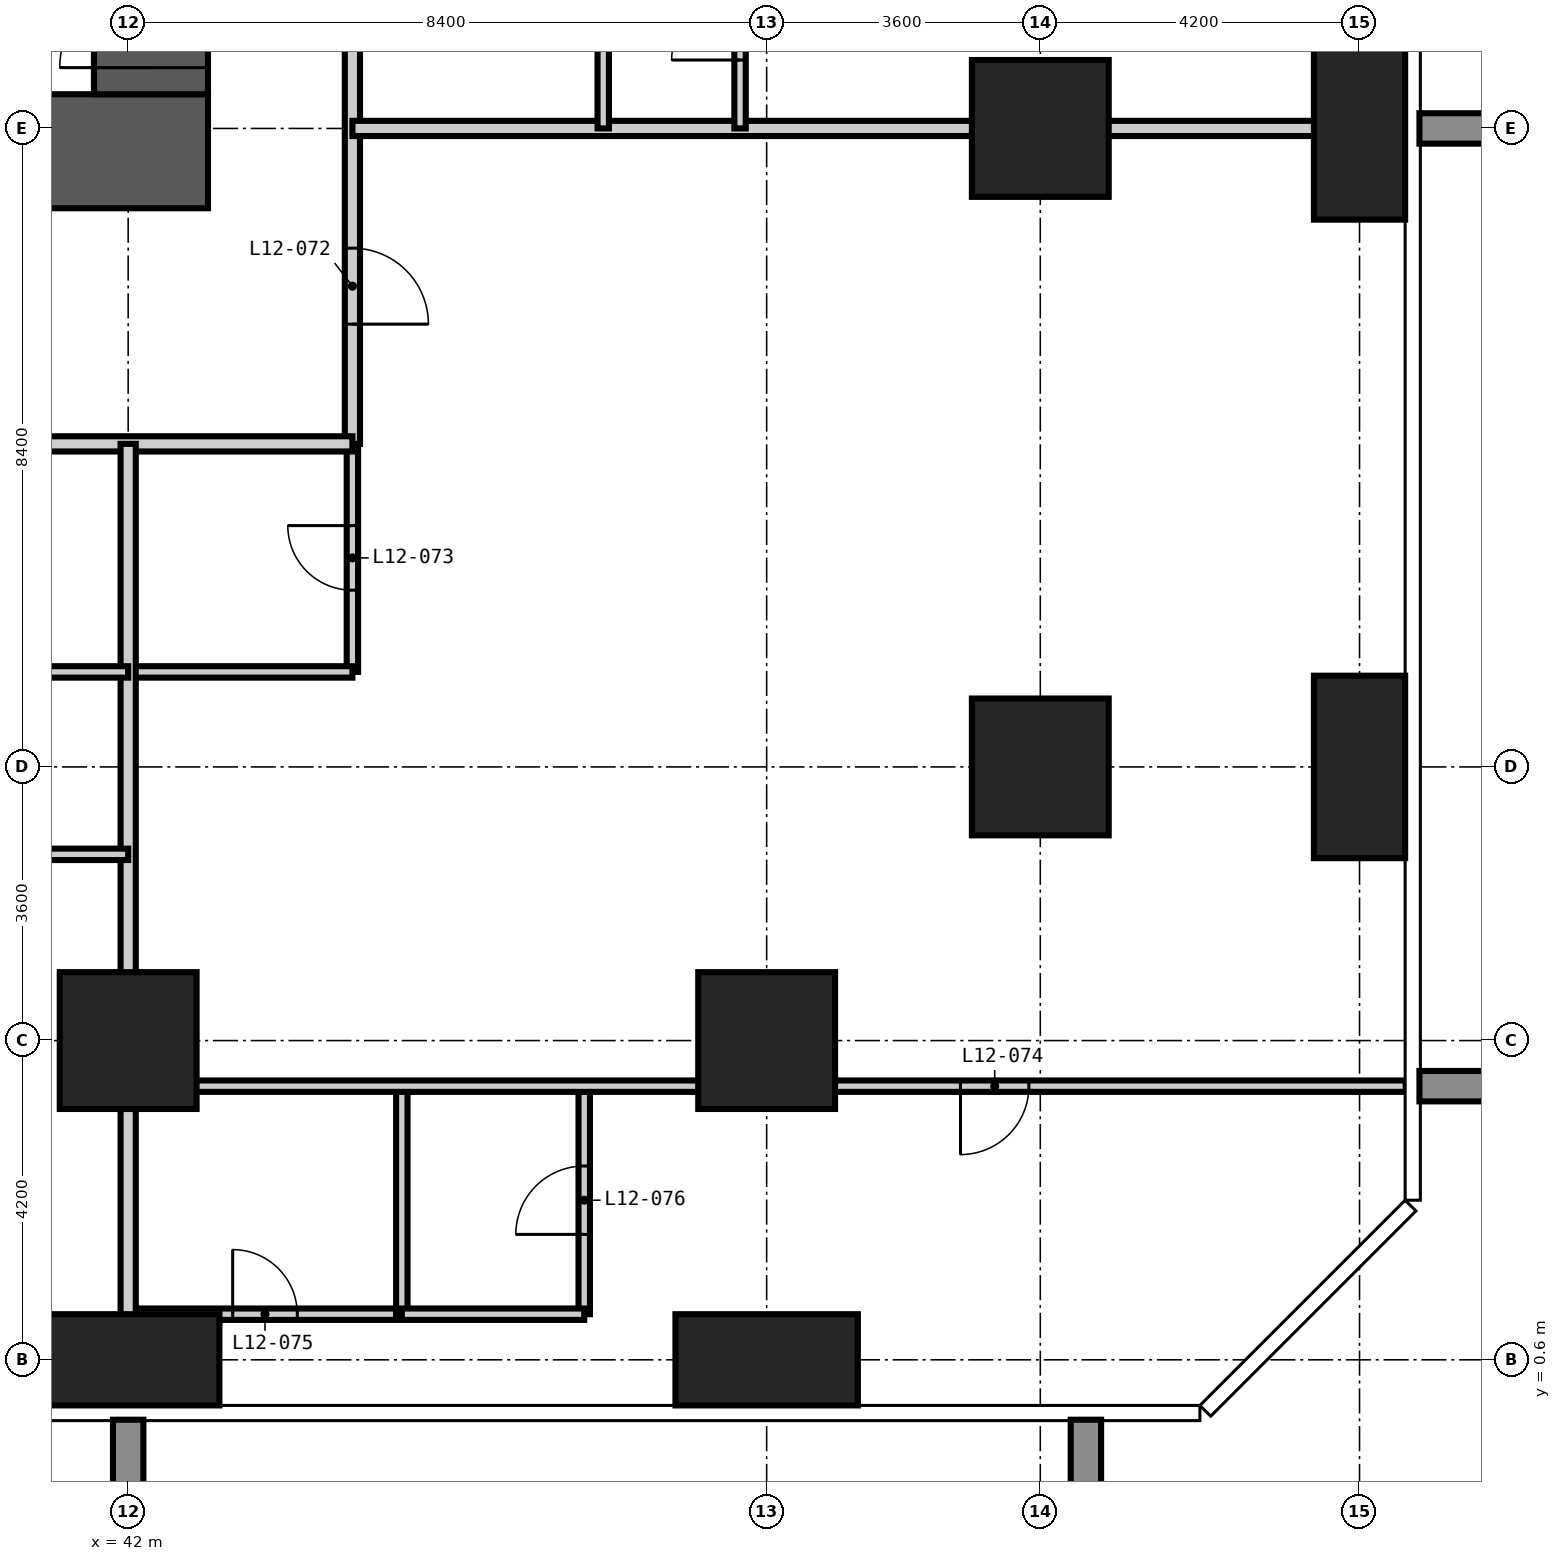
"""IFC4 building model, lengths in metres.
Left out: names, types, materials, properties, quantities, classifications, styles, units other than length and angle.
Written with IfcOpenShell. Run it as: python <this file> out.ifc"""

import sys

from ifc_helpers import new_model, si_unit, direction, frame, frame_2d, origin, origin_2d, place, context, subcontext, project, spatial, rectangle, extrude, element, fill, save


model = new_model("IFC4")
c1 = context("Model", 3, precision=1e-05, world=origin(), true_north=direction((0.0, 1.0)))
c2 = subcontext(c1, "Body", "Model", "MODEL_VIEW")
j1 = project(units=[si_unit("LENGTHUNIT", "METRE"), si_unit("PLANEANGLEUNIT", "RADIAN")], contexts=[c1])
p1 = place(None, origin())
s1 = spatial("IfcSite", under=j1, at=p1, CompositionType="ELEMENT")
p2 = place(p1, origin())
s2 = spatial("IfcBuilding", under=s1, at=p2, CompositionType="ELEMENT")
p3 = place(p2, frame((0.0, 0.0, 52.2)))
s3 = spatial("IfcBuildingStorey", under=s2, at=p3, CompositionType="ELEMENT", Elevation=52.2)
p4 = place(p3, frame((42.0, 0.6, -0.35), z_axis=(0.0, 0.0, 1.0), x_axis=(1.0, 0.0, 0.0)))
e1 = element("IfcColumn", 1, at=p4, inside=s3, PredefinedType="COLUMN", context=c2, shape_type="SweptSolid", body=[
    extrude(rectangle(XDim=2.4, YDim=1.2, at=origin_2d()), origin(), (0.0, 0.0, 1.0), 3.6),
])
p5 = place(p3, frame((42.0, 4.8, -0.35), z_axis=(0.0, 0.0, 1.0), x_axis=(1.0, 0.0, 0.0)))
e2 = element("IfcColumn", 2, at=p5, inside=s3, PredefinedType="COLUMN", context=c2, shape_type="SweptSolid", body=[
    extrude(rectangle(XDim=1.8, YDim=1.8, at=origin_2d()), origin(), (0.0, 0.0, 1.0), 3.6),
])
p6 = place(p3, frame((50.4, 0.6, -0.35), z_axis=(0.0, 0.0, 1.0), x_axis=(1.0, 0.0, 0.0)))
e3 = element("IfcColumn", 3, at=p6, inside=s3, PredefinedType="COLUMN", context=c2, shape_type="SweptSolid", body=[
    extrude(rectangle(XDim=2.4, YDim=1.2, at=origin_2d()), origin(), (0.0, 0.0, 1.0), 3.6),
])
for number, where, z_axis, x_axis in (
    (4, (50.4, 4.8, -0.35), (0.0, 0.0, 1.0), (1.0, 0.0, 0.0)),
    (5, (54.0, 8.4, -0.35), (0.0, 0.0, 1.0), (1.0, 0.0, 0.0)),
    (6, (54.0, 16.8, -0.35), (0.0, 0.0, 1.0), (1.0, 0.0, 0.0)),
):
    element("IfcColumn", number, at=place(p3, frame(where, z_axis=z_axis, x_axis=x_axis)), inside=s3, PredefinedType="COLUMN", context=c2, shape_type="SweptSolid", body=[
        extrude(rectangle(XDim=1.8, YDim=1.8, at=origin_2d()), origin(), (0.0, 0.0, 1.0), 3.6),
    ])
for number, where, z_axis, x_axis in (
    (7, (58.2, 8.4, -0.35), (0.0, 0.0, 1.0), (1.0, 0.0, 0.0)),
    (8, (58.2, 16.8, -0.35), (0.0, 0.0, 1.0), (1.0, 0.0, 0.0)),
):
    element("IfcColumn", number, at=place(p3, frame(where, z_axis=z_axis, x_axis=x_axis)), inside=s3, PredefinedType="COLUMN", context=c2, shape_type="SweptSolid", body=[
        extrude(rectangle(XDim=1.2, YDim=2.4, at=origin_2d()), origin(), (0.0, 0.0, 1.0), 3.6),
    ])
p7 = place(p3, frame((15.75, 16.5, -0.35), z_axis=(0.0, 0.0, 1.0), x_axis=(1.0, 0.0, 0.0)))
e9 = element("IfcWall", 9, at=p7, inside=s3, PredefinedType="SHEAR", context=c2, shape_type="SweptSolid", body=[
    extrude(rectangle(XDim=27.3, YDim=1.5, at=frame_2d((13.65, 0.0))), origin(), (0.0, 0.0, 1.0), 3.6),
])
p8 = place(p7, frame((13.15, 0.0, 0.35)))
e10 = element("IfcOpeningElement", 10, at=p8, cuts=e9, PredefinedType="OPENING", context=c2, shape_type="SweptSolid", body=[
    extrude(rectangle(XDim=1.0, YDim=2.1, at=frame_2d((0.5, 1.05))), frame((0.0, 0.76, 0.0), z_axis=(0.0, -1.0, 0.0), x_axis=(1.0, 0.0, 0.0)), (0.0, 0.0, 1.0), 1.52),
])
p9 = place(p7, frame((19.45, 0.0, 0.35)))
e11 = element("IfcOpeningElement", 11, at=p9, cuts=e9, PredefinedType="OPENING", context=c2, shape_type="SweptSolid", body=[
    extrude(rectangle(XDim=1.0, YDim=2.1, at=frame_2d((0.5, 1.05))), frame((0.0, 0.76, 0.0), z_axis=(0.0, -1.0, 0.0), x_axis=(1.0, 0.0, 0.0)), (0.0, 0.0, 1.0), 1.52),
])
p10 = place(p3, frame((42.3, 17.25, -0.35), z_axis=(0.0, 0.0, 1.0), x_axis=(0.0, 1.0, 0.0)))
e12 = element("IfcWall", 12, at=p10, inside=s3, PredefinedType="SHEAR", context=c2, shape_type="SweptSolid", body=[
    extrude(rectangle(XDim=24.3, YDim=1.5, at=frame_2d((12.15, 0.0))), origin(), (0.0, 0.0, 1.0), 3.6),
])
p11 = place(p10, frame((0.35, 0.0, 0.35)))
e13 = element("IfcOpeningElement", 13, at=p11, cuts=e12, PredefinedType="OPENING", context=c2, shape_type="SweptSolid", body=[
    extrude(rectangle(XDim=1.2, YDim=2.2, at=frame_2d((0.6, 1.1))), frame((0.0, 0.76, 0.0), z_axis=(0.0, -1.0, 0.0), x_axis=(1.0, 0.0, 0.0)), (0.0, 0.0, 1.0), 1.52),
])
p12 = place(p10, frame((11.65, 0.0, 0.35)))
e14 = element("IfcOpeningElement", 14, at=p12, cuts=e12, PredefinedType="OPENING", context=c2, shape_type="SweptSolid", body=[
    extrude(rectangle(XDim=1.0, YDim=2.1, at=frame_2d((0.5, 1.05))), frame((0.0, 0.76, 0.0), z_axis=(0.0, -1.0, 0.0), x_axis=(1.0, 0.0, 0.0)), (0.0, 0.0, 1.0), 1.52),
])
p13 = place(p10, frame((20.05, 0.0, 0.35)))
e15 = element("IfcOpeningElement", 15, at=p13, cuts=e12, PredefinedType="OPENING", context=c2, shape_type="SweptSolid", body=[
    extrude(rectangle(XDim=1.0, YDim=2.1, at=frame_2d((0.5, 1.05))), frame((0.0, 0.76, 0.0), z_axis=(0.0, -1.0, 0.0), x_axis=(1.0, 0.0, 0.0)), (0.0, 0.0, 1.0), 1.52),
])
p14 = place(p3, frame((44.95, 9.65, 0.0), z_axis=(0.0, 0.0, 1.0), x_axis=(0.0, 1.0, 0.0)))
e16 = element("IfcWall", 16, at=p14, inside=s3, PredefinedType="PARTITIONING", context=c2, shape_type="SweptSolid", body=[
    extrude(rectangle(XDim=3.0, YDim=0.15, at=frame_2d((1.5, 0.0))), origin(), (0.0, 0.0, 1.0), 3.25),
])
p15 = place(p14, frame((1.075, 0.0, 0.0)))
e17 = element("IfcOpeningElement", 17, at=p15, cuts=e16, PredefinedType="OPENING", context=c2, shape_type="SweptSolid", body=[
    extrude(rectangle(XDim=0.85, YDim=2.1, at=frame_2d((0.425, 1.05))), frame((0.0, 0.085, 0.0), z_axis=(0.0, -1.0, 0.0), x_axis=(1.0, 0.0, 0.0)), (0.0, 0.0, 1.0), 0.17),
])
p16 = place(p3, frame((42.0, 1.2, 0.0), z_axis=(0.0, 0.0, 1.0), x_axis=(1.0, 0.0, 0.0)))
e18 = element("IfcWall", 18, at=p16, inside=s3, PredefinedType="PARTITIONING", context=c2, shape_type="SweptSolid", body=[
    extrude(rectangle(XDim=3.6, YDim=0.15, at=frame_2d((1.8, 0.0))), origin(), (0.0, 0.0, 1.0), 3.25),
])
p17 = place(p16, frame((1.375, 0.0, 0.0)))
e19 = element("IfcOpeningElement", 19, at=p17, cuts=e18, PredefinedType="OPENING", context=c2, shape_type="SweptSolid", body=[
    extrude(rectangle(XDim=0.85, YDim=2.1, at=frame_2d((0.425, 1.05))), frame((0.0, 0.085, 0.0), z_axis=(0.0, -1.0, 0.0), x_axis=(1.0, 0.0, 0.0)), (0.0, 0.0, 1.0), 0.17),
])
p18 = place(p3, frame((42.0, 9.65, 0.0), z_axis=(0.0, 0.0, 1.0), x_axis=(1.0, 0.0, 0.0)))
e20 = element("IfcWall", 20, at=p18, inside=s3, PredefinedType="PARTITIONING", context=c2, shape_type="SweptSolid", body=[
    extrude(rectangle(XDim=2.95, YDim=0.15, at=frame_2d((1.475, 0.0))), origin(), (0.0, 0.0, 1.0), 3.25),
])
p19 = place(p3, frame((44.95, 45.55, 0.0), z_axis=(0.0, 0.0, 1.0), x_axis=(0.0, -1.0, 0.0)))
e21 = element("IfcWall", 21, at=p19, inside=s3, PredefinedType="PARTITIONING", context=c2, shape_type="SweptSolid", body=[
    extrude(rectangle(XDim=32.9, YDim=0.2, at=frame_2d((16.45, 0.0))), origin(), (0.0, 0.0, 1.0), 3.25),
])
p20 = place(p19, frame((24.8, 0.0, 0.0)))
e22 = element("IfcOpeningElement", 22, at=p20, cuts=e21, PredefinedType="OPENING", context=c2, shape_type="SweptSolid", body=[
    extrude(rectangle(XDim=1.0, YDim=2.2, at=frame_2d((0.5, 1.1))), frame((0.0, 0.11, 0.0), z_axis=(0.0, -1.0, 0.0), x_axis=(1.0, 0.0, 0.0)), (0.0, 0.0, 1.0), 0.22),
])
p21 = place(p19, frame((19.85, 0.0, 0.0)))
e23 = element("IfcOpeningElement", 23, at=p21, cuts=e21, PredefinedType="OPENING", context=c2, shape_type="SweptSolid", body=[
    extrude(rectangle(XDim=1.0, YDim=2.2, at=frame_2d((0.5, 1.1))), frame((0.0, 0.11, 0.0), z_axis=(0.0, -1.0, 0.0), x_axis=(1.0, 0.0, 0.0)), (0.0, 0.0, 1.0), 0.22),
])
p22 = place(p19, frame((11.45, 0.0, 0.0)))
e24 = element("IfcOpeningElement", 24, at=p22, cuts=e21, PredefinedType="OPENING", context=c2, shape_type="SweptSolid", body=[
    extrude(rectangle(XDim=1.0, YDim=2.2, at=frame_2d((0.5, 1.1))), frame((0.0, 0.11, 0.0), z_axis=(0.0, -1.0, 0.0), x_axis=(1.0, 0.0, 0.0)), (0.0, 0.0, 1.0), 0.22),
])
p23 = place(p19, frame((6.5, 0.0, 0.0)))
e25 = element("IfcOpeningElement", 25, at=p23, cuts=e21, PredefinedType="OPENING", context=c2, shape_type="SweptSolid", body=[
    extrude(rectangle(XDim=1.0, YDim=2.2, at=frame_2d((0.5, 1.1))), frame((0.0, 0.11, 0.0), z_axis=(0.0, -1.0, 0.0), x_axis=(1.0, 0.0, 0.0)), (0.0, 0.0, 1.0), 0.22),
])
p24 = place(p19, frame((30.325, 0.0, 0.0)))
e26 = element("IfcOpeningElement", 26, at=p24, cuts=e21, PredefinedType="OPENING", context=c2, shape_type="SweptSolid", body=[
    extrude(rectangle(XDim=1.0, YDim=2.2, at=frame_2d((0.5, 1.1))), frame((0.0, 0.11, 0.0), z_axis=(0.0, -1.0, 0.0), x_axis=(1.0, 0.0, 0.0)), (0.0, 0.0, 1.0), 0.22),
])
p25 = place(p19, frame((1.275, 0.0, 0.0)))
e27 = element("IfcOpeningElement", 27, at=p25, cuts=e21, PredefinedType="OPENING", context=c2, shape_type="SweptSolid", body=[
    extrude(rectangle(XDim=1.0, YDim=2.2, at=frame_2d((0.5, 1.1))), frame((0.0, 0.11, 0.0), z_axis=(0.0, -1.0, 0.0), x_axis=(1.0, 0.0, 0.0)), (0.0, 0.0, 1.0), 0.22),
])
p26 = place(p3, frame((44.95, 12.65, 0.0), z_axis=(0.0, 0.0, 1.0), x_axis=(-1.0, 0.0, 0.0)))
e28 = element("IfcWall", 28, at=p26, inside=s3, PredefinedType="PARTITIONING", context=c2, shape_type="SweptSolid", body=[
    extrude(rectangle(XDim=32.3, YDim=0.2, at=frame_2d((16.15, 0.0))), origin(), (0.0, 0.0, 1.0), 3.25),
])
p27 = place(p26, frame((24.35, 0.0, 0.0)))
e29 = element("IfcOpeningElement", 29, at=p27, cuts=e28, PredefinedType="OPENING", context=c2, shape_type="SweptSolid", body=[
    extrude(rectangle(XDim=1.0, YDim=2.2, at=frame_2d((0.5, 1.1))), frame((0.0, 0.11, 0.0), z_axis=(0.0, -1.0, 0.0), x_axis=(1.0, 0.0, 0.0)), (0.0, 0.0, 1.0), 0.22),
])
p28 = place(p26, frame((15.95, 0.0, 0.0)))
e30 = element("IfcOpeningElement", 30, at=p28, cuts=e28, PredefinedType="OPENING", context=c2, shape_type="SweptSolid", body=[
    extrude(rectangle(XDim=1.0, YDim=2.2, at=frame_2d((0.5, 1.1))), frame((0.0, 0.11, 0.0), z_axis=(0.0, -1.0, 0.0), x_axis=(1.0, 0.0, 0.0)), (0.0, 0.0, 1.0), 0.22),
])
p29 = place(p26, frame((7.55, 0.0, 0.0)))
e31 = element("IfcOpeningElement", 31, at=p29, cuts=e28, PredefinedType="OPENING", context=c2, shape_type="SweptSolid", body=[
    extrude(rectangle(XDim=1.0, YDim=2.2, at=frame_2d((0.5, 1.1))), frame((0.0, 0.11, 0.0), z_axis=(0.0, -1.0, 0.0), x_axis=(1.0, 0.0, 0.0)), (0.0, 0.0, 1.0), 0.22),
])
p30 = place(p3, frame((42.0, -0.008, 0.0), z_axis=(0.0, 0.0, 1.0), x_axis=(0.0, 1.0, 0.0)))
e32 = element("IfcWall", 32, at=p30, inside=s3, PredefinedType="PARTITIONING", context=c2, shape_type="SweptSolid", body=[
    extrude(rectangle(XDim=12.658, YDim=0.2, at=frame_2d((6.329, 0.0))), origin(), (0.0, 0.0, 1.0), 3.25),
])
p31 = place(p3, frame((44.95, 16.8, 0.0), z_axis=(0.0, 0.0, 1.0), x_axis=(1.0, 0.0, 0.0)))
e33 = element("IfcWall", 33, at=p31, inside=s3, PredefinedType="PARTITIONING", context=c2, shape_type="SweptSolid", body=[
    extrude(rectangle(XDim=13.858, YDim=0.2, at=frame_2d((6.929, 0.0))), origin(), (0.0, 0.0, 1.0), 3.25),
])
p32 = place(p3, frame((45.6, 1.2, 0.0), z_axis=(0.0, 0.0, 1.0), x_axis=(0.0, 1.0, 0.0)))
e34 = element("IfcWall", 34, at=p32, inside=s3, PredefinedType="PARTITIONING", context=c2, shape_type="SweptSolid", body=[
    extrude(rectangle(XDim=3.0, YDim=0.15, at=frame_2d((1.5, 0.0))), origin(), (0.0, 0.0, 1.0), 3.25),
])
p33 = place(p3, frame((48.0, 1.2, 0.0), z_axis=(0.0, 0.0, 1.0), x_axis=(0.0, 1.0, 0.0)))
e35 = element("IfcWall", 35, at=p33, inside=s3, PredefinedType="PARTITIONING", context=c2, shape_type="SweptSolid", body=[
    extrude(rectangle(XDim=3.0, YDim=0.15, at=frame_2d((1.5, 0.0))), origin(), (0.0, 0.0, 1.0), 3.25),
])
p34 = place(p33, frame((1.05, 0.0, 0.0)))
e36 = element("IfcOpeningElement", 36, at=p34, cuts=e35, PredefinedType="OPENING", context=c2, shape_type="SweptSolid", body=[
    extrude(rectangle(XDim=0.9, YDim=2.1, at=frame_2d((0.45, 1.05))), frame((0.0, 0.085, 0.0), z_axis=(0.0, -1.0, 0.0), x_axis=(1.0, 0.0, 0.0)), (0.0, 0.0, 1.0), 0.17),
])
p35 = place(p3, frame((48.25, 16.8, 0.0), z_axis=(0.0, 0.0, 1.0), x_axis=(0.0, 1.0, 0.0)))
e37 = element("IfcWall", 37, at=p35, inside=s3, PredefinedType="PARTITIONING", context=c2, shape_type="SweptSolid", body=[
    extrude(rectangle(XDim=2.7, YDim=0.15, at=frame_2d((1.35, 0.0))), origin(), (0.0, 0.0, 1.0), 3.25),
])
p36 = place(p3, frame((50.05, 16.8, 0.0), z_axis=(0.0, 0.0, 1.0), x_axis=(0.0, 1.0, 0.0)))
e38 = element("IfcWall", 38, at=p36, inside=s3, PredefinedType="PARTITIONING", context=c2, shape_type="SweptSolid", body=[
    extrude(rectangle(XDim=2.7, YDim=0.15, at=frame_2d((1.35, 0.0))), origin(), (0.0, 0.0, 1.0), 3.25),
])
p37 = place(p36, frame((0.9, 0.0, 0.0)))
e39 = element("IfcOpeningElement", 39, at=p37, cuts=e38, PredefinedType="OPENING", context=c2, shape_type="SweptSolid", body=[
    extrude(rectangle(XDim=0.9, YDim=2.1, at=frame_2d((0.45, 1.05))), frame((0.0, 0.085, 0.0), z_axis=(0.0, -1.0, 0.0), x_axis=(1.0, 0.0, 0.0)), (0.0, 0.0, 1.0), 0.17),
])
p38 = place(p3, frame((45.6, 1.2, 0.0), z_axis=(0.0, 0.0, 1.0), x_axis=(1.0, 0.0, 0.0)))
e40 = element("IfcWall", 40, at=p38, inside=s3, PredefinedType="PARTITIONING", context=c2, shape_type="SweptSolid", body=[
    extrude(rectangle(XDim=2.4, YDim=0.15, at=frame_2d((1.2, 0.0))), origin(), (0.0, 0.0, 1.0), 3.25),
])
p39 = place(p3, frame((42.0, 4.2, 0.0), z_axis=(0.0, 0.0, 1.0), x_axis=(1.0, 0.0, 0.0)))
e41 = element("IfcWall", 41, at=p39, inside=s3, PredefinedType="PARTITIONING", context=c2, shape_type="SweptSolid", body=[
    extrude(rectangle(XDim=16.808, YDim=0.15, at=frame_2d((8.404, 0.0))), origin(), (0.0, 0.0, 1.0), 3.25),
])
p40 = place(p39, frame((10.95, 0.0, 0.0)))
e42 = element("IfcOpeningElement", 42, at=p40, cuts=e41, PredefinedType="OPENING", context=c2, shape_type="SweptSolid", body=[
    extrude(rectangle(XDim=0.9, YDim=2.1, at=frame_2d((0.45, 1.05))), frame((0.0, 0.085, 0.0), z_axis=(0.0, -1.0, 0.0), x_axis=(1.0, 0.0, 0.0)), (0.0, 0.0, 1.0), 0.17),
])
p41 = place(p3, frame((37.8, 7.25, 0.0), z_axis=(0.0, 0.0, 1.0), x_axis=(1.0, 0.0, 0.0)))
e43 = element("IfcWall", 43, at=p41, inside=s3, PredefinedType="PARTITIONING", context=c2, shape_type="SweptSolid", body=[
    extrude(rectangle(XDim=4.2, YDim=0.15, at=frame_2d((2.1, 0.0))), origin(), (0.0, 0.0, 1.0), 3.25),
])
p42 = place(p41, frame((1.65, 0.0, 0.0)))
e44 = element("IfcOpeningElement", 44, at=p42, cuts=e43, PredefinedType="OPENING", context=c2, shape_type="SweptSolid", body=[
    extrude(rectangle(XDim=0.9, YDim=2.1, at=frame_2d((0.45, 1.05))), frame((0.0, 0.085, 0.0), z_axis=(0.0, -1.0, 0.0), x_axis=(1.0, 0.0, 0.0)), (0.0, 0.0, 1.0), 0.17),
])
p43 = place(p3, frame((37.8, 9.65, 0.0), z_axis=(0.0, 0.0, 1.0), x_axis=(1.0, 0.0, 0.0)))
e45 = element("IfcWall", 45, at=p43, inside=s3, PredefinedType="PARTITIONING", context=c2, shape_type="SweptSolid", body=[
    extrude(rectangle(XDim=4.2, YDim=0.15, at=frame_2d((2.1, 0.0))), origin(), (0.0, 0.0, 1.0), 3.25),
])
p44 = place(p11, origin())
e46 = element("IfcDoor", 46, at=p44, inside=s3, OperationType="SINGLE_SWING_LEFT", PredefinedType="DOOR", context=c2, shape_type="SweptSolid", body=[
    extrude(rectangle(XDim=1.2, YDim=2.2, at=frame_2d((0.6, 1.1))), frame((0.0, 0.025, 0.0), z_axis=(0.0, -1.0, 0.0), x_axis=(1.0, 0.0, 0.0)), (0.0, 0.0, 1.0), 0.05),
])
fill(e13, e46)
p45 = place(p37, origin())
e47 = element("IfcDoor", 47, at=p45, inside=s3, OperationType="SINGLE_SWING_LEFT", PredefinedType="DOOR", context=c2, shape_type="SweptSolid", body=[
    extrude(rectangle(XDim=0.9, YDim=2.1, at=frame_2d((0.45, 1.05))), frame((0.0, 0.025, 0.0), z_axis=(0.0, -1.0, 0.0), x_axis=(1.0, 0.0, 0.0)), (0.0, 0.0, 1.0), 0.05),
])
fill(e39, e47)
p46 = place(p24, origin())
e48 = element("IfcDoor", 48, at=p46, inside=s3, OperationType="SINGLE_SWING_RIGHT", PredefinedType="DOOR", context=c2, shape_type="SweptSolid", body=[
    extrude(rectangle(XDim=1.0, YDim=2.2, at=frame_2d((0.5, 1.1))), frame((0.0, 0.025, 0.0), z_axis=(0.0, -1.0, 0.0), x_axis=(1.0, 0.0, 0.0)), (0.0, 0.0, 1.0), 0.05),
])
fill(e26, e48)
p47 = place(p15, origin())
e49 = element("IfcDoor", 49, at=p47, inside=s3, OperationType="SINGLE_SWING_RIGHT", PredefinedType="DOOR", context=c2, shape_type="SweptSolid", body=[
    extrude(rectangle(XDim=0.85, YDim=2.1, at=frame_2d((0.425, 1.05))), frame((0.0, 0.025, 0.0), z_axis=(0.0, -1.0, 0.0), x_axis=(1.0, 0.0, 0.0)), (0.0, 0.0, 1.0), 0.05),
])
fill(e17, e49)
p48 = place(p40, frame((0.9, 0.0, 0.0), z_axis=(0.0, 0.0, 1.0), x_axis=(-1.0, 0.0, 0.0)))
e50 = element("IfcDoor", 50, at=p48, inside=s3, OperationType="SINGLE_SWING_RIGHT", PredefinedType="DOOR", context=c2, shape_type="SweptSolid", body=[
    extrude(rectangle(XDim=0.9, YDim=2.1, at=frame_2d((0.45, 1.05))), frame((0.0, 0.025, 0.0), z_axis=(0.0, -1.0, 0.0), x_axis=(1.0, 0.0, 0.0)), (0.0, 0.0, 1.0), 0.05),
])
fill(e42, e50)
p49 = place(p17, origin())
e51 = element("IfcDoor", 51, at=p49, inside=s3, OperationType="SINGLE_SWING_LEFT", PredefinedType="DOOR", context=c2, shape_type="SweptSolid", body=[
    extrude(rectangle(XDim=0.85, YDim=2.1, at=frame_2d((0.425, 1.05))), frame((0.0, 0.025, 0.0), z_axis=(0.0, -1.0, 0.0), x_axis=(1.0, 0.0, 0.0)), (0.0, 0.0, 1.0), 0.05),
])
fill(e19, e51)
p50 = place(p34, origin())
e52 = element("IfcDoor", 52, at=p50, inside=s3, OperationType="SINGLE_SWING_LEFT", PredefinedType="DOOR", context=c2, shape_type="SweptSolid", body=[
    extrude(rectangle(XDim=0.9, YDim=2.1, at=frame_2d((0.45, 1.05))), frame((0.0, 0.025, 0.0), z_axis=(0.0, -1.0, 0.0), x_axis=(1.0, 0.0, 0.0)), (0.0, 0.0, 1.0), 0.05),
])
fill(e36, e52)
save(model, sys.argv[1])
